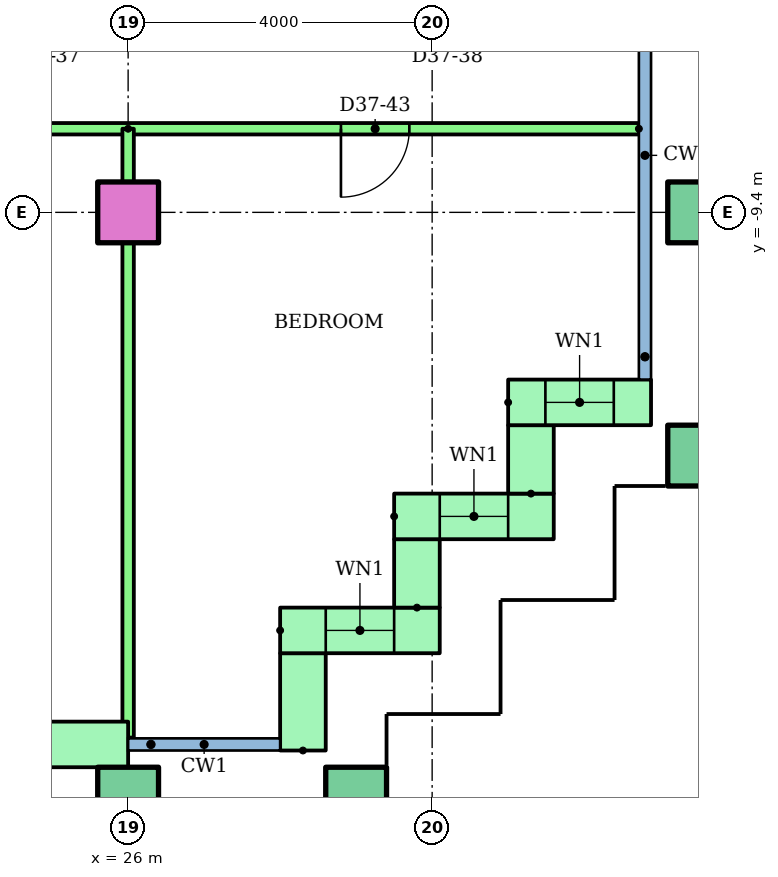
"""IFC4 building model, lengths in metres.
Left out: names, types, materials, properties, quantities, classifications, styles, units other than length and angle.
Written with IfcOpenShell. Run it as: python <this file> out.ifc"""

import sys

from ifc_helpers import new_model, si_unit, direction, frame, frame_2d, origin, origin_2d, place, context, subcontext, project, spatial, rectangle, hollow_rectangle, extrude, element, fill, save


model = new_model("IFC4")
c1 = context("Model", 3, precision=1e-05, world=origin(), true_north=direction((0.0, 1.0)))
c2 = subcontext(c1, "Body", "Model", "MODEL_VIEW")
j1 = project(units=[si_unit("LENGTHUNIT", "METRE"), si_unit("PLANEANGLEUNIT", "RADIAN")], contexts=[c1])
p1 = place(None, origin())
s1 = spatial("IfcSite", under=j1, at=p1, CompositionType="ELEMENT")
p2 = place(p1, origin())
s2 = spatial("IfcBuilding", under=s1, at=p2, CompositionType="ELEMENT")
p3 = place(p2, frame((0.0, 0.0, 142.2)))
s3 = spatial("IfcBuildingStorey", under=s2, at=p3, CompositionType="ELEMENT", Elevation=142.2)
for number, where in (
    (1, (26.0, -17.1, 0.0)),
    (2, (29.0, -17.1, 0.0)),
    (3, (33.5, -12.6, 0.0)),
):
    element("IfcColumn", number, at=place(p3, frame(where)), inside=s3, PredefinedType="COLUMN", context=c2, shape_type="SweptSolid", body=[
        extrude(hollow_rectangle(XDim=0.8, YDim=0.8, WallThickness=0.04, at=origin_2d()), origin(), (0.0, 0.0, 1.0), 3.2),
    ])
p4 = place(p3, frame((26.0, -9.4, 0.0)))
e4 = element("IfcColumn", 4, at=p4, inside=s3, PredefinedType="COLUMN", context=c2, shape_type="SweptSolid", body=[
    extrude(rectangle(XDim=0.8, YDim=0.8, at=origin_2d()), origin(), (0.0, 0.0, 1.0), 3.2),
])
p5 = place(p3, frame((33.5, -9.4, 0.0)))
e5 = element("IfcColumn", 5, at=p5, inside=s3, PredefinedType="COLUMN", context=c2, shape_type="SweptSolid", body=[
    extrude(hollow_rectangle(XDim=0.8, YDim=0.8, WallThickness=0.04, at=origin_2d()), origin(), (0.0, 0.0, 1.0), 3.2),
])
p6 = place(p3, frame((22.0, -16.4, 0.0)))
e6 = element("IfcWall", 6, at=p6, inside=s3, PredefinedType="STANDARD", context=c2, shape_type="SweptSolid", body=[
    extrude(rectangle(XDim=4.0, YDim=0.6, at=frame_2d((2.0, 0.0))), origin(), (0.0, 0.0, 1.0), 2.92),
])
p7 = place(p6, frame((1.4, 0.0, 0.0)))
e7 = element("IfcOpeningElement", 7, at=p7, cuts=e6, PredefinedType="OPENING", context=c2, shape_type="SweptSolid", body=[
    extrude(rectangle(XDim=1.2, YDim=2.1, at=frame_2d((0.6, 1.05))), frame((0.0, 0.31, 0.0), z_axis=(0.0, -1.0, 0.0), x_axis=(1.0, 0.0, 0.0)), (0.0, 0.0, 1.0), 0.62),
])
p8 = place(p3, frame((28.3, -16.48, 0.0), z_axis=(0.0, 0.0, 1.0), x_axis=(0.0, 1.0, 0.0)))
e8 = element("IfcWall", 8, at=p8, inside=s3, PredefinedType="STANDARD", context=c2, shape_type="SweptSolid", body=[
    extrude(rectangle(XDim=1.28, YDim=0.6, at=frame_2d((0.64, 0.0))), origin(), (0.0, 0.0, 1.0), 2.92),
])
p9 = place(p3, frame((28.0, -14.9, 0.0)))
e9 = element("IfcWall", 9, at=p9, inside=s3, PredefinedType="STANDARD", context=c2, shape_type="SweptSolid", body=[
    extrude(rectangle(XDim=2.1, YDim=0.6, at=frame_2d((1.05, 0.0))), origin(), (0.0, 0.0, 1.0), 2.92),
])
p10 = place(p9, frame((0.6, 0.0, 0.9)))
e10 = element("IfcOpeningElement", 10, at=p10, cuts=e9, PredefinedType="OPENING", context=c2, shape_type="SweptSolid", body=[
    extrude(rectangle(XDim=0.9, YDim=1.5, at=frame_2d((0.45, 0.75))), frame((0.0, 0.31, 0.0), z_axis=(0.0, -1.0, 0.0), x_axis=(1.0, 0.0, 0.0)), (0.0, 0.0, 1.0), 0.62),
])
p11 = place(p3, frame((29.8, -14.6, 0.0), z_axis=(0.0, 0.0, 1.0), x_axis=(0.0, 1.0, 0.0)))
e11 = element("IfcWall", 11, at=p11, inside=s3, PredefinedType="STANDARD", context=c2, shape_type="SweptSolid", body=[
    extrude(rectangle(XDim=0.9, YDim=0.6, at=frame_2d((0.45, 0.0))), origin(), (0.0, 0.0, 1.0), 2.92),
])
p12 = place(p3, frame((29.5, -13.4, 0.0)))
e12 = element("IfcWall", 12, at=p12, inside=s3, PredefinedType="STANDARD", context=c2, shape_type="SweptSolid", body=[
    extrude(rectangle(XDim=2.1, YDim=0.6, at=frame_2d((1.05, 0.0))), origin(), (0.0, 0.0, 1.0), 2.92),
])
p13 = place(p12, frame((0.6, 0.0, 0.9)))
e13 = element("IfcOpeningElement", 13, at=p13, cuts=e12, PredefinedType="OPENING", context=c2, shape_type="SweptSolid", body=[
    extrude(rectangle(XDim=0.9, YDim=1.5, at=frame_2d((0.45, 0.75))), frame((0.0, 0.31, 0.0), z_axis=(0.0, -1.0, 0.0), x_axis=(1.0, 0.0, 0.0)), (0.0, 0.0, 1.0), 0.62),
])
p14 = place(p3, frame((31.3, -13.1, 0.0), z_axis=(0.0, 0.0, 1.0), x_axis=(0.0, 1.0, 0.0)))
e14 = element("IfcWall", 14, at=p14, inside=s3, PredefinedType="STANDARD", context=c2, shape_type="SweptSolid", body=[
    extrude(rectangle(XDim=0.9, YDim=0.6, at=frame_2d((0.45, 0.0))), origin(), (0.0, 0.0, 1.0), 2.92),
])
p15 = place(p3, frame((31.0, -11.9, 0.0)))
e15 = element("IfcWall", 15, at=p15, inside=s3, PredefinedType="STANDARD", context=c2, shape_type="SweptSolid", body=[
    extrude(rectangle(XDim=1.88, YDim=0.6, at=frame_2d((0.94, 0.0))), origin(), (0.0, 0.0, 1.0), 2.92),
])
p16 = place(p15, frame((0.49, 0.0, 0.9)))
e16 = element("IfcOpeningElement", 16, at=p16, cuts=e15, PredefinedType="OPENING", context=c2, shape_type="SweptSolid", body=[
    extrude(rectangle(XDim=0.9, YDim=1.5, at=frame_2d((0.45, 0.75))), frame((0.0, 0.31, 0.0), z_axis=(0.0, -1.0, 0.0), x_axis=(1.0, 0.0, 0.0)), (0.0, 0.0, 1.0), 0.62),
])
p17 = place(p3, frame((32.72, -8.3, 0.0), z_axis=(0.0, 0.0, 1.0), x_axis=(-1.0, 0.0, 0.0)))
e17 = element("IfcWall", 17, at=p17, inside=s3, PredefinedType="PARTITIONING", context=c2, shape_type="SweptSolid", body=[
    extrude(rectangle(XDim=22.72, YDim=0.15, at=frame_2d((11.36, 0.0))), origin(), (0.0, 0.0, 1.0), 2.4),
])
p18 = place(p17, frame((20.27, 0.0, 0.0)))
e18 = element("IfcOpeningElement", 18, at=p18, cuts=e17, PredefinedType="OPENING", context=c2, shape_type="SweptSolid", body=[
    extrude(rectangle(XDim=0.9, YDim=2.1, at=frame_2d((0.45, 1.05))), frame((0.0, 0.085, 0.0), z_axis=(0.0, -1.0, 0.0), x_axis=(1.0, 0.0, 0.0)), (0.0, 0.0, 1.0), 0.17),
])
p19 = place(p17, frame((16.27, 0.0, 0.0)))
e19 = element("IfcOpeningElement", 19, at=p19, cuts=e17, PredefinedType="OPENING", context=c2, shape_type="SweptSolid", body=[
    extrude(rectangle(XDim=0.9, YDim=2.1, at=frame_2d((0.45, 1.05))), frame((0.0, 0.085, 0.0), z_axis=(0.0, -1.0, 0.0), x_axis=(1.0, 0.0, 0.0)), (0.0, 0.0, 1.0), 0.17),
])
p20 = place(p17, frame((12.27, 0.0, 0.0)))
e20 = element("IfcOpeningElement", 20, at=p20, cuts=e17, PredefinedType="OPENING", context=c2, shape_type="SweptSolid", body=[
    extrude(rectangle(XDim=0.9, YDim=2.1, at=frame_2d((0.45, 1.05))), frame((0.0, 0.085, 0.0), z_axis=(0.0, -1.0, 0.0), x_axis=(1.0, 0.0, 0.0)), (0.0, 0.0, 1.0), 0.17),
])
p21 = place(p17, frame((8.22, 0.0, 0.0)))
e21 = element("IfcOpeningElement", 21, at=p21, cuts=e17, PredefinedType="OPENING", context=c2, shape_type="SweptSolid", body=[
    extrude(rectangle(XDim=1.0, YDim=2.1, at=frame_2d((0.5, 1.05))), frame((0.0, 0.085, 0.0), z_axis=(0.0, -1.0, 0.0), x_axis=(1.0, 0.0, 0.0)), (0.0, 0.0, 1.0), 0.17),
])
p22 = place(p17, frame((3.02, 0.0, 0.0)))
e22 = element("IfcOpeningElement", 22, at=p22, cuts=e17, PredefinedType="OPENING", context=c2, shape_type="SweptSolid", body=[
    extrude(rectangle(XDim=0.9, YDim=2.1, at=frame_2d((0.45, 1.05))), frame((0.0, 0.085, 0.0), z_axis=(0.0, -1.0, 0.0), x_axis=(1.0, 0.0, 0.0)), (0.0, 0.0, 1.0), 0.17),
])
p23 = place(p3, frame((26.0, -8.3, 0.0), z_axis=(0.0, 0.0, 1.0), x_axis=(0.0, -1.0, 0.0)))
e23 = element("IfcWall", 23, at=p23, inside=s3, PredefinedType="PARTITIONING", context=c2, shape_type="SweptSolid", body=[
    extrude(rectangle(XDim=8.01, YDim=0.15, at=frame_2d((4.005, 0.0))), origin(), (0.0, 0.0, 1.0), 2.4),
])
p24 = place(p10, origin())
e24 = element("IfcWindow", 24, at=p24, inside=s3, PartitioningType="SINGLE_PANEL", PredefinedType="WINDOW", context=c2, shape_type="SweptSolid", body=[
    extrude(rectangle(XDim=0.9, YDim=1.5, at=frame_2d((0.45, 0.75))), frame((0.0, 0.03, 0.0), z_axis=(0.0, -1.0, 0.0), x_axis=(1.0, 0.0, 0.0)), (0.0, 0.0, 1.0), 0.06),
])
fill(e10, e24)
p25 = place(p13, origin())
e25 = element("IfcWindow", 25, at=p25, inside=s3, PartitioningType="SINGLE_PANEL", PredefinedType="WINDOW", context=c2, shape_type="SweptSolid", body=[
    extrude(rectangle(XDim=0.9, YDim=1.5, at=frame_2d((0.45, 0.75))), frame((0.0, 0.03, 0.0), z_axis=(0.0, -1.0, 0.0), x_axis=(1.0, 0.0, 0.0)), (0.0, 0.0, 1.0), 0.06),
])
fill(e13, e25)
p26 = place(p16, origin())
e26 = element("IfcWindow", 26, at=p26, inside=s3, PartitioningType="SINGLE_PANEL", PredefinedType="WINDOW", context=c2, shape_type="SweptSolid", body=[
    extrude(rectangle(XDim=0.9, YDim=1.5, at=frame_2d((0.45, 0.75))), frame((0.0, 0.03, 0.0), z_axis=(0.0, -1.0, 0.0), x_axis=(1.0, 0.0, 0.0)), (0.0, 0.0, 1.0), 0.06),
])
fill(e16, e26)
p27 = place(p22, origin())
e27 = element("IfcDoor", 27, at=p27, inside=s3, OperationType="SINGLE_SWING_RIGHT", PredefinedType="DOOR", context=c2, shape_type="SweptSolid", body=[
    extrude(rectangle(XDim=0.9, YDim=2.1, at=frame_2d((0.45, 1.05))), frame((0.0, 0.025, 0.0), z_axis=(0.0, -1.0, 0.0), x_axis=(1.0, 0.0, 0.0)), (0.0, 0.0, 1.0), 0.05),
])
fill(e22, e27)
save(model, sys.argv[1])
